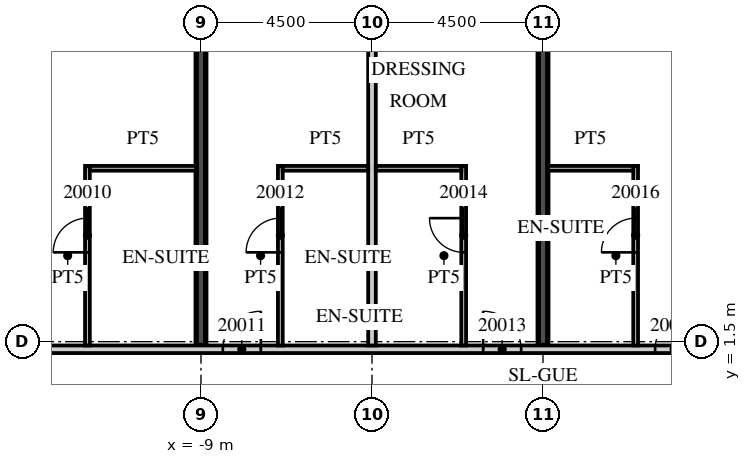
"""IFC4 building model, lengths in metres.
Left out: names, types, materials, properties, quantities, classifications, styles, units other than length and angle.
Written with IfcOpenShell. Run it as: python <this file> out.ifc"""

import sys

from ifc_helpers import new_model, si_unit, direction, frame, frame_2d, origin, place, context, subcontext, project, spatial, rectangle, extrude, element, fill, save


model = new_model("IFC4")
c1 = context("Model", 3, precision=1e-05, world=origin(), true_north=direction((0.0, 1.0)))
c2 = subcontext(c1, "Body", "Model", "MODEL_VIEW")
j1 = project(units=[si_unit("LENGTHUNIT", "METRE"), si_unit("PLANEANGLEUNIT", "RADIAN")], contexts=[c1])
p1 = place(None, origin())
s1 = spatial("IfcSite", under=j1, at=p1, CompositionType="ELEMENT")
p2 = place(p1, origin())
s2 = spatial("IfcBuilding", under=s1, at=p2, CompositionType="ELEMENT")
p3 = place(p2, frame((0.0, 0.0, 96.3)))
s3 = spatial("IfcBuildingStorey", under=s2, at=p3, CompositionType="ELEMENT", Elevation=96.3)
for number, where, z_axis, x_axis in (
    (1, (-9.0, 1.4, 0.0), (0.0, 0.0, 1.0), (0.0, 1.0, 0.0)),
    (2, (0.0, 1.4, 0.0), (0.0, 0.0, 1.0), (0.0, 1.0, 0.0)),
):
    element("IfcWall", number, at=place(p3, frame(where, z_axis=z_axis, x_axis=x_axis)), inside=s3, PredefinedType="SHEAR", context=c2, shape_type="SweptSolid", body=[
        extrude(rectangle(XDim=20.14, YDim=0.25, at=frame_2d((10.07, 0.0))), origin(), (0.0, 0.0, 1.0), 3.0),
    ])
p4 = place(p3, frame((-44.55, 1.3, 0.0), z_axis=(0.0, 0.0, 1.0), x_axis=(1.0, 0.0, 0.0)))
e3 = element("IfcWall", 3, at=p4, inside=s3, PredefinedType="PARTITIONING", context=c2, shape_type="SweptSolid", body=[
    extrude(rectangle(XDim=58.05, YDim=0.2, at=frame_2d((29.025, 0.0))), origin(), (0.0, 0.0, 1.0), 3.0),
])
p5 = place(p4, frame((0.525, 0.0, 0.0)))
e4 = element("IfcOpeningElement", 4, at=p5, cuts=e3, PredefinedType="OPENING", context=c2, shape_type="SweptSolid", body=[
    extrude(rectangle(XDim=1.0, YDim=2.1, at=frame_2d((0.5, 1.05))), frame((0.0, 0.11, 0.0), z_axis=(0.0, -1.0, 0.0), x_axis=(1.0, 0.0, 0.0)), (0.0, 0.0, 1.0), 0.22),
])
p6 = place(p4, frame((4.625, 0.0, 0.0)))
e5 = element("IfcOpeningElement", 5, at=p6, cuts=e3, PredefinedType="OPENING", context=c2, shape_type="SweptSolid", body=[
    extrude(rectangle(XDim=1.0, YDim=2.1, at=frame_2d((0.5, 1.05))), frame((0.0, 0.11, 0.0), z_axis=(0.0, -1.0, 0.0), x_axis=(1.0, 0.0, 0.0)), (0.0, 0.0, 1.0), 0.22),
])
p7 = place(p4, frame((10.987, 0.0, 0.0)))
e6 = element("IfcOpeningElement", 6, at=p7, cuts=e3, PredefinedType="OPENING", context=c2, shape_type="SweptSolid", body=[
    extrude(rectangle(XDim=1.2, YDim=2.1, at=frame_2d((0.6, 1.05))), frame((0.0, 0.11, 0.0), z_axis=(0.0, -1.0, 0.0), x_axis=(1.0, 0.0, 0.0)), (0.0, 0.0, 1.0), 0.22),
])
p8 = place(p4, frame((22.912, 0.0, 0.0)))
e7 = element("IfcOpeningElement", 7, at=p8, cuts=e3, PredefinedType="OPENING", context=c2, shape_type="SweptSolid", body=[
    extrude(rectangle(XDim=1.2, YDim=2.1, at=frame_2d((0.6, 1.05))), frame((0.0, 0.11, 0.0), z_axis=(0.0, -1.0, 0.0), x_axis=(1.0, 0.0, 0.0)), (0.0, 0.0, 1.0), 0.22),
])
p9 = place(p4, frame((28.987, 0.0, 0.0)))
e8 = element("IfcOpeningElement", 8, at=p9, cuts=e3, PredefinedType="OPENING", context=c2, shape_type="SweptSolid", body=[
    extrude(rectangle(XDim=1.2, YDim=2.1, at=frame_2d((0.6, 1.05))), frame((0.0, 0.11, 0.0), z_axis=(0.0, -1.0, 0.0), x_axis=(1.0, 0.0, 0.0)), (0.0, 0.0, 1.0), 0.22),
])
p10 = place(p4, frame((36.125, 0.0, 0.0)))
e9 = element("IfcOpeningElement", 9, at=p10, cuts=e3, PredefinedType="OPENING", context=c2, shape_type="SweptSolid", body=[
    extrude(rectangle(XDim=1.0, YDim=2.1, at=frame_2d((0.5, 1.05))), frame((0.0, 0.11, 0.0), z_axis=(0.0, -1.0, 0.0), x_axis=(1.0, 0.0, 0.0)), (0.0, 0.0, 1.0), 0.22),
])
p11 = place(p4, frame((42.975, 0.0, 0.0)))
e10 = element("IfcOpeningElement", 10, at=p11, cuts=e3, PredefinedType="OPENING", context=c2, shape_type="SweptSolid", body=[
    extrude(rectangle(XDim=1.0, YDim=2.1, at=frame_2d((0.5, 1.05))), frame((0.0, 0.11, 0.0), z_axis=(0.0, -1.0, 0.0), x_axis=(1.0, 0.0, 0.0)), (0.0, 0.0, 1.0), 0.22),
])
p12 = place(p4, frame((47.5, 0.0, 0.0)))
e11 = element("IfcOpeningElement", 11, at=p12, cuts=e3, PredefinedType="OPENING", context=c2, shape_type="SweptSolid", body=[
    extrude(rectangle(XDim=1.0, YDim=2.1, at=frame_2d((0.5, 1.05))), frame((0.0, 0.11, 0.0), z_axis=(0.0, -1.0, 0.0), x_axis=(1.0, 0.0, 0.0)), (0.0, 0.0, 1.0), 0.22),
])
p13 = place(p4, frame((49.6, 0.0, 0.0)))
e12 = element("IfcOpeningElement", 12, at=p13, cuts=e3, PredefinedType="OPENING", context=c2, shape_type="SweptSolid", body=[
    extrude(rectangle(XDim=1.0, YDim=2.1, at=frame_2d((0.5, 1.05))), frame((0.0, 0.11, 0.0), z_axis=(0.0, -1.0, 0.0), x_axis=(1.0, 0.0, 0.0)), (0.0, 0.0, 1.0), 0.22),
])
p14 = place(p4, frame((56.475, 0.0, 0.0)))
e13 = element("IfcOpeningElement", 13, at=p14, cuts=e3, PredefinedType="OPENING", context=c2, shape_type="SweptSolid", body=[
    extrude(rectangle(XDim=1.0, YDim=2.1, at=frame_2d((0.5, 1.05))), frame((0.0, 0.11, 0.0), z_axis=(0.0, -1.0, 0.0), x_axis=(1.0, 0.0, 0.0)), (0.0, 0.0, 1.0), 0.22),
])
p15 = place(p3, frame((-11.988, 1.4, 0.0), z_axis=(0.0, 0.0, 1.0), x_axis=(0.0, 1.0, 0.0)))
e14 = element("IfcWall", 14, at=p15, inside=s3, PredefinedType="PARTITIONING", context=c2, shape_type="SweptSolid", body=[
    extrude(rectangle(XDim=4.725, YDim=0.125, at=frame_2d((2.363, 0.0))), origin(), (0.0, 0.0, 1.0), 3.0),
])
p16 = place(p15, frame((2.45, 0.0, 0.0)))
e15 = element("IfcOpeningElement", 15, at=p16, cuts=e14, PredefinedType="OPENING", context=c2, shape_type="SweptSolid", body=[
    extrude(rectangle(XDim=0.9, YDim=2.1, at=frame_2d((0.45, 1.05))), frame((0.0, 0.073, 0.0), z_axis=(0.0, -1.0, 0.0), x_axis=(1.0, 0.0, 0.0)), (0.0, 0.0, 1.0), 0.145),
])
p17 = place(p3, frame((-11.925, 6.062, 0.0), z_axis=(0.0, 0.0, 1.0), x_axis=(1.0, 0.0, 0.0)))
e16 = element("IfcWall", 16, at=p17, inside=s3, PredefinedType="PARTITIONING", context=c2, shape_type="SweptSolid", body=[
    extrude(rectangle(XDim=2.8, YDim=0.125, at=frame_2d((1.4, 0.0))), origin(), (0.0, 0.0, 1.0), 3.0),
])
p18 = place(p3, frame((-4.5, 1.4, 0.0), z_axis=(0.0, 0.0, 1.0), x_axis=(0.0, 1.0, 0.0)))
e17 = element("IfcWall", 17, at=p18, inside=s3, PredefinedType="PARTITIONING", context=c2, shape_type="SweptSolid", body=[
    extrude(rectangle(XDim=20.15, YDim=0.2, at=frame_2d((10.075, 0.0))), origin(), (0.0, 0.0, 1.0), 3.0),
])
p19 = place(p3, frame((-6.912, 1.4, 0.0), z_axis=(0.0, 0.0, 1.0), x_axis=(0.0, 1.0, 0.0)))
e18 = element("IfcWall", 18, at=p19, inside=s3, PredefinedType="PARTITIONING", context=c2, shape_type="SweptSolid", body=[
    extrude(rectangle(XDim=4.725, YDim=0.125, at=frame_2d((2.363, 0.0))), origin(), (0.0, 0.0, 1.0), 3.0),
])
p20 = place(p19, frame((2.45, 0.0, 0.0)))
e19 = element("IfcOpeningElement", 19, at=p20, cuts=e18, PredefinedType="OPENING", context=c2, shape_type="SweptSolid", body=[
    extrude(rectangle(XDim=0.9, YDim=2.1, at=frame_2d((0.45, 1.05))), frame((0.0, 0.073, 0.0), z_axis=(0.0, -1.0, 0.0), x_axis=(1.0, 0.0, 0.0)), (0.0, 0.0, 1.0), 0.145),
])
p21 = place(p3, frame((-6.85, 6.062, 0.0), z_axis=(0.0, 0.0, 1.0), x_axis=(1.0, 0.0, 0.0)))
e20 = element("IfcWall", 20, at=p21, inside=s3, PredefinedType="PARTITIONING", context=c2, shape_type="SweptSolid", body=[
    extrude(rectangle(XDim=2.25, YDim=0.125, at=frame_2d((1.125, 0.0))), origin(), (0.0, 0.0, 1.0), 3.0),
])
p22 = place(p3, frame((-2.087, 1.4, 0.0), z_axis=(0.0, 0.0, 1.0), x_axis=(0.0, 1.0, 0.0)))
e21 = element("IfcWall", 21, at=p22, inside=s3, PredefinedType="PARTITIONING", context=c2, shape_type="SweptSolid", body=[
    extrude(rectangle(XDim=4.725, YDim=0.125, at=frame_2d((2.363, 0.0))), origin(), (0.0, 0.0, 1.0), 3.0),
])
p23 = place(p22, frame((2.45, 0.0, 0.0)))
e22 = element("IfcOpeningElement", 22, at=p23, cuts=e21, PredefinedType="OPENING", context=c2, shape_type="SweptSolid", body=[
    extrude(rectangle(XDim=0.9, YDim=2.1, at=frame_2d((0.45, 1.05))), frame((0.0, 0.073, 0.0), z_axis=(0.0, -1.0, 0.0), x_axis=(1.0, 0.0, 0.0)), (0.0, 0.0, 1.0), 0.145),
])
p24 = place(p3, frame((-4.4, 6.062, 0.0), z_axis=(0.0, 0.0, 1.0), x_axis=(1.0, 0.0, 0.0)))
e23 = element("IfcWall", 23, at=p24, inside=s3, PredefinedType="PARTITIONING", context=c2, shape_type="SweptSolid", body=[
    extrude(rectangle(XDim=2.25, YDim=0.125, at=frame_2d((1.125, 0.0))), origin(), (0.0, 0.0, 1.0), 3.0),
])
p25 = place(p3, frame((2.438, 1.4, 0.0), z_axis=(0.0, 0.0, 1.0), x_axis=(0.0, 1.0, 0.0)))
e24 = element("IfcWall", 24, at=p25, inside=s3, PredefinedType="PARTITIONING", context=c2, shape_type="SweptSolid", body=[
    extrude(rectangle(XDim=4.725, YDim=0.125, at=frame_2d((2.363, 0.0))), origin(), (0.0, 0.0, 1.0), 3.0),
])
p26 = place(p25, frame((2.45, 0.0, 0.0)))
e25 = element("IfcOpeningElement", 25, at=p26, cuts=e24, PredefinedType="OPENING", context=c2, shape_type="SweptSolid", body=[
    extrude(rectangle(XDim=0.9, YDim=2.1, at=frame_2d((0.45, 1.05))), frame((0.0, 0.073, 0.0), z_axis=(0.0, -1.0, 0.0), x_axis=(1.0, 0.0, 0.0)), (0.0, 0.0, 1.0), 0.145),
])
p27 = place(p3, frame((0.125, 6.062, 0.0), z_axis=(0.0, 0.0, 1.0), x_axis=(1.0, 0.0, 0.0)))
e26 = element("IfcWall", 26, at=p27, inside=s3, PredefinedType="PARTITIONING", context=c2, shape_type="SweptSolid", body=[
    extrude(rectangle(XDim=2.25, YDim=0.125, at=frame_2d((1.125, 0.0))), origin(), (0.0, 0.0, 1.0), 3.0),
])
p28 = place(p16, origin())
e27 = element("IfcDoor", 27, at=p28, inside=s3, OperationType="SINGLE_SWING_LEFT", PredefinedType="DOOR", context=c2, shape_type="SweptSolid", body=[
    extrude(rectangle(XDim=0.9, YDim=2.1, at=frame_2d((0.45, 1.05))), frame((0.0, 0.025, 0.0), z_axis=(0.0, -1.0, 0.0), x_axis=(1.0, 0.0, 0.0)), (0.0, 0.0, 1.0), 0.05),
])
fill(e15, e27)
p29 = place(p10, origin())
e28 = element("IfcDoor", 28, at=p29, inside=s3, OperationType="SINGLE_SWING_RIGHT", PredefinedType="DOOR", context=c2, shape_type="SweptSolid", body=[
    extrude(rectangle(XDim=1.0, YDim=2.1, at=frame_2d((0.5, 1.05))), frame((0.0, 0.025, 0.0), z_axis=(0.0, -1.0, 0.0), x_axis=(1.0, 0.0, 0.0)), (0.0, 0.0, 1.0), 0.05),
])
fill(e9, e28)
p30 = place(p20, origin())
e29 = element("IfcDoor", 29, at=p30, inside=s3, OperationType="SINGLE_SWING_LEFT", PredefinedType="DOOR", context=c2, shape_type="SweptSolid", body=[
    extrude(rectangle(XDim=0.9, YDim=2.1, at=frame_2d((0.45, 1.05))), frame((0.0, 0.025, 0.0), z_axis=(0.0, -1.0, 0.0), x_axis=(1.0, 0.0, 0.0)), (0.0, 0.0, 1.0), 0.05),
])
fill(e19, e29)
p31 = place(p11, origin())
e30 = element("IfcDoor", 30, at=p31, inside=s3, OperationType="SINGLE_SWING_LEFT", PredefinedType="DOOR", context=c2, shape_type="SweptSolid", body=[
    extrude(rectangle(XDim=1.0, YDim=2.1, at=frame_2d((0.5, 1.05))), frame((0.0, 0.025, 0.0), z_axis=(0.0, -1.0, 0.0), x_axis=(1.0, 0.0, 0.0)), (0.0, 0.0, 1.0), 0.05),
])
fill(e10, e30)
p32 = place(p23, origin())
e31 = element("IfcDoor", 31, at=p32, inside=s3, OperationType="SINGLE_SWING_RIGHT", PredefinedType="DOOR", context=c2, shape_type="SweptSolid", body=[
    extrude(rectangle(XDim=0.9, YDim=2.1, at=frame_2d((0.45, 1.05))), frame((0.0, 0.025, 0.0), z_axis=(0.0, -1.0, 0.0), x_axis=(1.0, 0.0, 0.0)), (0.0, 0.0, 1.0), 0.05),
])
fill(e22, e31)
p33 = place(p12, origin())
e32 = element("IfcDoor", 32, at=p33, inside=s3, OperationType="SINGLE_SWING_RIGHT", PredefinedType="DOOR", context=c2, shape_type="SweptSolid", body=[
    extrude(rectangle(XDim=1.0, YDim=2.1, at=frame_2d((0.5, 1.05))), frame((0.0, 0.025, 0.0), z_axis=(0.0, -1.0, 0.0), x_axis=(1.0, 0.0, 0.0)), (0.0, 0.0, 1.0), 0.05),
])
fill(e11, e32)
p34 = place(p26, origin())
e33 = element("IfcDoor", 33, at=p34, inside=s3, OperationType="SINGLE_SWING_LEFT", PredefinedType="DOOR", context=c2, shape_type="SweptSolid", body=[
    extrude(rectangle(XDim=0.9, YDim=2.1, at=frame_2d((0.45, 1.05))), frame((0.0, 0.025, 0.0), z_axis=(0.0, -1.0, 0.0), x_axis=(1.0, 0.0, 0.0)), (0.0, 0.0, 1.0), 0.05),
])
fill(e25, e33)
save(model, sys.argv[1])
